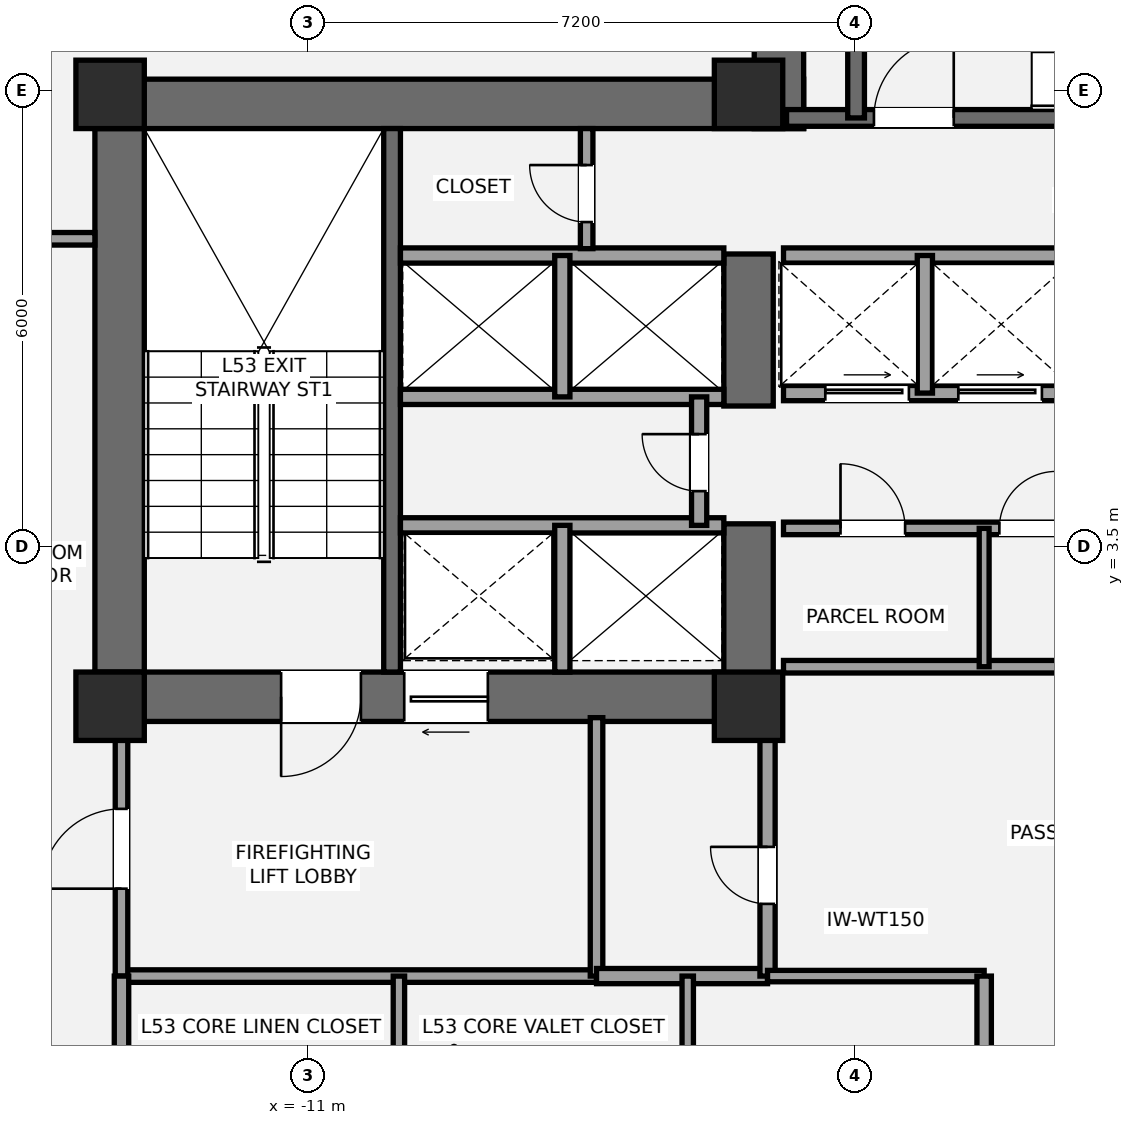
"""IFC4 building model, lengths in metres.
Left out: names, types, materials, properties, quantities, classifications, styles, units other than length and angle.
Written with IfcOpenShell. Run it as: python <this file> out.ifc"""

import sys

from ifc_helpers import new_model, si_unit, direction, frame, frame_2d, origin, origin_2d, place, context, subcontext, project, spatial, rectangle, extrude, element, fill, save


model = new_model("IFC4")
c1 = context("Model", 3, precision=1e-05, world=origin(), true_north=direction((0.0, 1.0)))
c2 = subcontext(c1, "Body", "Model", "MODEL_VIEW")
j1 = project(units=[si_unit("LENGTHUNIT", "METRE"), si_unit("PLANEANGLEUNIT", "RADIAN")], contexts=[c1])
p1 = place(None, origin())
s1 = spatial("IfcSite", under=j1, at=p1, CompositionType="ELEMENT")
p2 = place(p1, origin())
s2 = spatial("IfcBuilding", under=s1, at=p2, CompositionType="ELEMENT")
p3 = place(p2, frame((0.0, 0.0, 191.8)))
s3 = spatial("IfcBuildingStorey", under=s2, at=p3, CompositionType="ELEMENT", Elevation=191.8)
p4 = place(p3, frame((-13.475, 1.2, 0.0), z_axis=(0.0, 0.0, 1.0), x_axis=(0.0, 1.0, 0.0)))
e1 = element("IfcWall", 1, at=p4, inside=s3, PredefinedType="SHEAR", context=c2, shape_type="SweptSolid", body=[
    extrude(rectangle(XDim=8.45, YDim=0.65, at=frame_2d((4.225, 0.0))), origin(), (0.0, 0.0, 1.0), 3.2),
])
p5 = place(p3, frame((-13.8, 9.325, 0.0), z_axis=(0.0, 0.0, 1.0), x_axis=(1.0, 0.0, 0.0)))
e2 = element("IfcWall", 2, at=p5, inside=s3, PredefinedType="SHEAR", context=c2, shape_type="SweptSolid", body=[
    extrude(rectangle(XDim=9.325, YDim=0.65, at=frame_2d((4.663, 0.0))), origin(), (0.0, 0.0, 1.0), 3.2),
])
p6 = place(p3, frame((-4.875, 1.525, 0.0), z_axis=(0.0, 0.0, 1.0), x_axis=(-1.0, 0.0, 0.0)))
e3 = element("IfcWall", 3, at=p6, inside=s3, PredefinedType="SHEAR", context=c2, shape_type="SweptSolid", body=[
    extrude(rectangle(XDim=8.925, YDim=0.65, at=frame_2d((4.462, 0.0))), origin(), (0.0, 0.0, 1.0), 3.2),
])
p7 = place(p6, frame((5.425, 0.0, 0.0)))
e4 = element("IfcOpeningElement", 4, at=p7, cuts=e3, PredefinedType="OPENING", context=c2, shape_type="SweptSolid", body=[
    extrude(rectangle(XDim=1.05, YDim=2.15, at=frame_2d((0.525, 1.075))), frame((0.0, 0.335, 0.0), z_axis=(0.0, -1.0, 0.0), x_axis=(1.0, 0.0, 0.0)), (0.0, 0.0, 1.0), 0.67),
])
p8 = place(p6, frame((3.755, 0.0, 0.0)))
e5 = element("IfcOpeningElement", 5, at=p8, cuts=e3, PredefinedType="OPENING", context=c2, shape_type="SweptSolid", body=[
    extrude(rectangle(XDim=1.1, YDim=2.2, at=frame_2d((0.55, 1.1))), frame((0.0, 0.335, 0.0), z_axis=(0.0, -1.0, 0.0), x_axis=(1.0, 0.0, 0.0)), (0.0, 0.0, 1.0), 0.67),
])
p9 = place(p3, frame((-5.2, 1.2, 0.0), z_axis=(0.0, 0.0, 1.0), x_axis=(0.0, 1.0, 0.0)))
e6 = element("IfcWall", 6, at=p9, inside=s3, PredefinedType="SHEAR", context=c2, shape_type="SweptSolid", body=[
    extrude(rectangle(XDim=2.6, YDim=0.65, at=frame_2d((1.3, 0.0))), origin(), (0.0, 0.0, 1.0), 3.2),
])
p10 = place(p3, frame((-5.2, 5.35, 0.0), z_axis=(0.0, 0.0, 1.0), x_axis=(0.0, 1.0, 0.0)))
e7 = element("IfcWall", 7, at=p10, inside=s3, PredefinedType="SHEAR", context=c2, shape_type="SweptSolid", body=[
    extrude(rectangle(XDim=2.0, YDim=0.65, at=frame_2d((1.0, 0.0))), origin(), (0.0, 0.0, 1.0), 3.2),
])
p11 = place(p3, frame((-9.89, 1.85, 0.0), z_axis=(0.0, 0.0, 1.0), x_axis=(0.0, 1.0, 0.0)))
e8 = element("IfcWall", 8, at=p11, inside=s3, PredefinedType="SHEAR", context=c2, shape_type="SweptSolid", body=[
    extrude(rectangle(XDim=7.15, YDim=0.22, at=frame_2d((3.575, 0.0))), origin(), (0.0, 0.0, 1.0), 3.2),
])
p12 = place(p3, frame((-4.8, 9.0, 0.0), z_axis=(0.0, 0.0, 1.0), x_axis=(0.0, 1.0, 0.0)))
e9 = element("IfcWall", 9, at=p12, inside=s3, PredefinedType="SHEAR", context=c2, shape_type="SweptSolid", body=[
    extrude(rectangle(XDim=4.05, YDim=0.65, at=frame_2d((2.025, 0.0))), origin(), (0.0, 0.0, 1.0), 3.2),
])
p13 = place(p3, frame((-4.7, 9.14, 0.0), z_axis=(0.0, 0.0, 1.0), x_axis=(1.0, 0.0, 0.0)))
e10 = element("IfcWall", 10, at=p13, inside=s3, PredefinedType="SHEAR", context=c2, shape_type="SweptSolid", body=[
    extrude(rectangle(XDim=9.3, YDim=0.22, at=frame_2d((4.65, 0.0))), origin(), (0.0, 0.0, 1.0), 3.2),
])
p14 = place(p13, frame((1.15, 0.0, 0.0)))
e11 = element("IfcOpeningElement", 11, at=p14, cuts=e10, PredefinedType="OPENING", context=c2, shape_type="SweptSolid", body=[
    extrude(rectangle(XDim=1.05, YDim=2.15, at=frame_2d((0.525, 1.075))), frame((0.0, 0.12, 0.0), z_axis=(0.0, -1.0, 0.0), x_axis=(1.0, 0.0, 0.0)), (0.0, 0.0, 1.0), 0.24),
])
p15 = place(p3, frame((-3.785, 9.14, 0.0), z_axis=(0.0, 0.0, 1.0), x_axis=(0.0, 1.0, 0.0)))
e12 = element("IfcWall", 12, at=p15, inside=s3, PredefinedType="SHEAR", context=c2, shape_type="SweptSolid", body=[
    extrude(rectangle(XDim=3.26, YDim=0.22, at=frame_2d((1.63, 0.0))), origin(), (0.0, 0.0, 1.0), 3.2),
])
for number, where, z_axis, x_axis in (
    (13, (-13.6, 1.4, 0.0), (0.0, 0.0, 1.0), (1.0, 0.0, 0.0)),
    (14, (-13.6, 9.45, 0.0), (0.0, 0.0, 1.0), (1.0, 0.0, 0.0)),
    (15, (-5.2, 1.4, 0.0), (0.0, 0.0, 1.0), (1.0, 0.0, 0.0)),
    (16, (-5.2, 9.45, 0.0), (0.0, 0.0, 1.0), (1.0, 0.0, 0.0)),
):
    element("IfcColumn", number, at=place(p3, frame(where, z_axis=z_axis, x_axis=x_axis)), inside=s3, PredefinedType="COLUMN", context=c2, shape_type="SweptSolid", body=[
        extrude(rectangle(XDim=0.9, YDim=0.9, at=origin_2d()), origin(), (0.0, 0.0, 1.0), 3.2),
    ])
p16 = place(p3, frame((-13.45, -2.15, 0.0), z_axis=(0.0, 0.0, 1.0), x_axis=(1.0, 0.0, 0.0)))
e17 = element("IfcWall", 17, at=p16, inside=s3, PredefinedType="PARTITIONING", context=c2, shape_type="SweptSolid", body=[
    extrude(rectangle(XDim=6.25, YDim=0.165, at=frame_2d((3.125, 0.0))), origin(), (0.0, 0.0, 1.0), 2.473),
])
p17 = place(p3, frame((-13.45, -2.15, 0.0), z_axis=(0.0, 0.0, 1.0), x_axis=(0.0, 1.0, 0.0)))
e18 = element("IfcWall", 18, at=p17, inside=s3, PredefinedType="PARTITIONING", context=c2, shape_type="SweptSolid", body=[
    extrude(rectangle(XDim=3.4, YDim=0.165, at=frame_2d((1.7, 0.0))), origin(), (0.0, 0.0, 1.0), 2.473),
])
p18 = place(p17, frame((1.15, 0.0, 0.0)))
e19 = element("IfcOpeningElement", 19, at=p18, cuts=e18, PredefinedType="OPENING", context=c2, shape_type="SweptSolid", body=[
    extrude(rectangle(XDim=1.05, YDim=2.15, at=frame_2d((0.525, 1.075))), frame((0.0, 0.093, 0.0), z_axis=(0.0, -1.0, 0.0), x_axis=(1.0, 0.0, 0.0)), (0.0, 0.0, 1.0), 0.185),
])
p19 = place(p3, frame((-7.2, -2.15, 0.0), z_axis=(0.0, 0.0, 1.0), x_axis=(0.0, 1.0, 0.0)))
e20 = element("IfcWall", 20, at=p19, inside=s3, PredefinedType="PARTITIONING", context=c2, shape_type="SweptSolid", body=[
    extrude(rectangle(XDim=3.4, YDim=0.165, at=frame_2d((1.7, 0.0))), origin(), (0.0, 0.0, 1.0), 2.473),
])
p20 = place(p3, frame((-7.2, -2.15, 0.0), z_axis=(0.0, 0.0, 1.0), x_axis=(1.0, 0.0, 0.0)))
e21 = element("IfcWall", 21, at=p20, inside=s3, PredefinedType="SOLIDWALL", context=c2, shape_type="SweptSolid", body=[
    extrude(rectangle(XDim=2.25, YDim=0.2, at=frame_2d((1.125, 0.0))), origin(), (0.0, 0.0, 1.0), 3.02),
])
p21 = place(p3, frame((-4.95, -2.15, 0.0), z_axis=(0.0, 0.0, 1.0), x_axis=(0.0, 1.0, 0.0)))
e22 = element("IfcWall", 22, at=p21, inside=s3, PredefinedType="SOLIDWALL", context=c2, shape_type="SweptSolid", body=[
    extrude(rectangle(XDim=3.4, YDim=0.2, at=frame_2d((1.7, 0.0))), origin(), (0.0, 0.0, 1.0), 2.473),
])
p22 = place(p21, frame((0.95, 0.0, 0.0)))
e23 = element("IfcOpeningElement", 23, at=p22, cuts=e22, PredefinedType="OPENING", context=c2, shape_type="SweptSolid", body=[
    extrude(rectangle(XDim=0.75, YDim=2.1, at=frame_2d((0.375, 1.05))), frame((0.0, 0.11, 0.0), z_axis=(0.0, -1.0, 0.0), x_axis=(1.0, 0.0, 0.0)), (0.0, 0.0, 1.0), 0.22),
])
p23 = place(p3, frame((-9.78, 3.78, 0.0), z_axis=(0.0, 0.0, 1.0), x_axis=(1.0, 0.0, 0.0)))
e24 = element("IfcWall", 24, at=p23, inside=s3, PredefinedType="SOLIDWALL", context=c2, shape_type="SweptSolid", body=[
    extrude(rectangle(XDim=4.255, YDim=0.2, at=frame_2d((2.127, 0.0))), origin(), (0.0, 0.0, 1.0), 3.02),
])
p24 = place(p3, frame((-7.65, 1.85, 0.0), z_axis=(0.0, 0.0, 1.0), x_axis=(0.0, 1.0, 0.0)))
e25 = element("IfcWall", 25, at=p24, inside=s3, PredefinedType="SOLIDWALL", context=c2, shape_type="SweptSolid", body=[
    extrude(rectangle(XDim=1.93, YDim=0.2, at=frame_2d((0.965, 0.0))), origin(), (0.0, 0.0, 1.0), 3.02),
])
for number, where, z_axis, x_axis in (
    (26, (-9.78, 5.47, 0.0), (0.0, 0.0, 1.0), (1.0, 0.0, 0.0)),
    (27, (-9.78, 7.33, 0.0), (0.0, 0.0, 1.0), (1.0, 0.0, 0.0)),
):
    element("IfcWall", number, at=place(p3, frame(where, z_axis=z_axis, x_axis=x_axis)), inside=s3, PredefinedType="SOLIDWALL", context=c2, shape_type="SweptSolid", body=[
        extrude(rectangle(XDim=4.255, YDim=0.2, at=frame_2d((2.127, 0.0))), origin(), (0.0, 0.0, 1.0), 3.02),
    ])
p25 = place(p3, frame((-7.65, 5.47, 0.0), z_axis=(0.0, 0.0, 1.0), x_axis=(0.0, 1.0, 0.0)))
e28 = element("IfcWall", 28, at=p25, inside=s3, PredefinedType="SOLIDWALL", context=c2, shape_type="SweptSolid", body=[
    extrude(rectangle(XDim=1.86, YDim=0.2, at=frame_2d((0.93, 0.0))), origin(), (0.0, 0.0, 1.0), 3.02),
])
p26 = place(p3, frame((-5.85, 3.78, 0.0), z_axis=(0.0, 0.0, 1.0), x_axis=(0.0, 1.0, 0.0)))
e29 = element("IfcWall", 29, at=p26, inside=s3, PredefinedType="SOLIDWALL", context=c2, shape_type="SweptSolid", body=[
    extrude(rectangle(XDim=1.69, YDim=0.2, at=frame_2d((0.845, 0.0))), origin(), (0.0, 0.0, 1.0), 3.02),
])
p27 = place(p26, frame((0.45, 0.0, 0.0)))
e30 = element("IfcOpeningElement", 30, at=p27, cuts=e29, PredefinedType="OPENING", context=c2, shape_type="SweptSolid", body=[
    extrude(rectangle(XDim=0.75, YDim=2.1, at=frame_2d((0.375, 1.05))), frame((0.0, 0.11, 0.0), z_axis=(0.0, -1.0, 0.0), x_axis=(1.0, 0.0, 0.0)), (0.0, 0.0, 1.0), 0.22),
])
p28 = place(p3, frame((-4.74, 1.92, 0.0), z_axis=(0.0, 0.0, 1.0), x_axis=(1.0, 0.0, 0.0)))
e31 = element("IfcWall", 31, at=p28, inside=s3, PredefinedType="PARTITIONING", context=c2, shape_type="SweptSolid", body=[
    extrude(rectangle(XDim=3.89, YDim=0.165, at=frame_2d((1.945, 0.0))), origin(), (0.0, 0.0, 1.0), 2.16),
])
p29 = place(p3, frame((-4.74, 3.74, 0.0), z_axis=(0.0, 0.0, 1.0), x_axis=(1.0, 0.0, 0.0)))
e32 = element("IfcWall", 32, at=p29, inside=s3, PredefinedType="PARTITIONING", context=c2, shape_type="SweptSolid", body=[
    extrude(rectangle(XDim=3.89, YDim=0.165, at=frame_2d((1.945, 0.0))), origin(), (0.0, 0.0, 1.0), 3.02),
])
p30 = place(p29, frame((0.75, 0.0, 0.0)))
e33 = element("IfcOpeningElement", 33, at=p30, cuts=e32, PredefinedType="OPENING", context=c2, shape_type="SweptSolid", body=[
    extrude(rectangle(XDim=0.85, YDim=2.1, at=frame_2d((0.425, 1.05))), frame((0.0, 0.093, 0.0), z_axis=(0.0, -1.0, 0.0), x_axis=(1.0, 0.0, 0.0)), (0.0, 0.0, 1.0), 0.185),
])
p31 = place(p29, frame((2.84, 0.0, 0.0)))
e34 = element("IfcOpeningElement", 34, at=p31, cuts=e32, PredefinedType="OPENING", context=c2, shape_type="SweptSolid", body=[
    extrude(rectangle(XDim=0.75, YDim=2.1, at=frame_2d((0.375, 1.05))), frame((0.0, 0.093, 0.0), z_axis=(0.0, -1.0, 0.0), x_axis=(1.0, 0.0, 0.0)), (0.0, 0.0, 1.0), 0.185),
])
p32 = place(p3, frame((-2.1, 1.92, 0.0), z_axis=(0.0, 0.0, 1.0), x_axis=(0.0, 1.0, 0.0)))
e35 = element("IfcWall", 35, at=p32, inside=s3, PredefinedType="PARTITIONING", context=c2, shape_type="SweptSolid", body=[
    extrude(rectangle(XDim=1.82, YDim=0.13, at=frame_2d((0.91, 0.0))), origin(), (0.0, 0.0, 1.0), 3.02),
])
p33 = place(p3, frame((-4.74, 5.52, 0.0), z_axis=(0.0, 0.0, 1.0), x_axis=(1.0, 0.0, 0.0)))
e36 = element("IfcWall", 36, at=p33, inside=s3, PredefinedType="SOLIDWALL", context=c2, shape_type="SweptSolid", body=[
    extrude(rectangle(XDim=3.86, YDim=0.2, at=frame_2d((1.93, 0.0))), origin(), (0.0, 0.0, 1.0), 3.02),
])
p34 = place(p33, frame((0.55, 0.0, 0.0)))
e37 = element("IfcOpeningElement", 37, at=p34, cuts=e36, PredefinedType="OPENING", context=c2, shape_type="SweptSolid", body=[
    extrude(rectangle(XDim=1.1, YDim=2.2, at=frame_2d((0.55, 1.1))), frame((0.0, 0.11, 0.0), z_axis=(0.0, -1.0, 0.0), x_axis=(1.0, 0.0, 0.0)), (0.0, 0.0, 1.0), 0.22),
])
p35 = place(p33, frame((2.3, 0.0, 0.0)))
e38 = element("IfcOpeningElement", 38, at=p35, cuts=e36, PredefinedType="OPENING", context=c2, shape_type="SweptSolid", body=[
    extrude(rectangle(XDim=1.1, YDim=2.2, at=frame_2d((0.55, 1.1))), frame((0.0, 0.11, 0.0), z_axis=(0.0, -1.0, 0.0), x_axis=(1.0, 0.0, 0.0)), (0.0, 0.0, 1.0), 0.22),
])
p36 = place(p3, frame((-4.74, 7.33, 0.0), z_axis=(0.0, 0.0, 1.0), x_axis=(1.0, 0.0, 0.0)))
e39 = element("IfcWall", 39, at=p36, inside=s3, PredefinedType="SOLIDWALL", context=c2, shape_type="SweptSolid", body=[
    extrude(rectangle(XDim=3.86, YDim=0.2, at=frame_2d((1.93, 0.0))), origin(), (0.0, 0.0, 1.0), 3.02),
])
p37 = place(p3, frame((-2.88, 5.52, 0.0), z_axis=(0.0, 0.0, 1.0), x_axis=(0.0, 1.0, 0.0)))
e40 = element("IfcWall", 40, at=p37, inside=s3, PredefinedType="SOLIDWALL", context=c2, shape_type="SweptSolid", body=[
    extrude(rectangle(XDim=1.81, YDim=0.2, at=frame_2d((0.905, 0.0))), origin(), (0.0, 0.0, 1.0), 3.02),
])
p38 = place(p3, frame((-7.33, 7.42, 0.0), z_axis=(0.0, 0.0, 1.0), x_axis=(0.0, 1.0, 0.0)))
e41 = element("IfcWall", 41, at=p38, inside=s3, PredefinedType="PARTITIONING", context=c2, shape_type="SweptSolid", body=[
    extrude(rectangle(XDim=1.58, YDim=0.165, at=frame_2d((0.79, 0.0))), origin(), (0.0, 0.0, 1.0), 3.02),
])
p39 = place(p38, frame((0.35, 0.0, 0.0)))
e42 = element("IfcOpeningElement", 42, at=p39, cuts=e41, PredefinedType="OPENING", context=c2, shape_type="SweptSolid", body=[
    extrude(rectangle(XDim=0.75, YDim=2.1, at=frame_2d((0.375, 1.05))), frame((0.0, 0.093, 0.0), z_axis=(0.0, -1.0, 0.0), x_axis=(1.0, 0.0, 0.0)), (0.0, 0.0, 1.0), 0.185),
])
p40 = place(p3, frame((-4.95, -2.15, 0.0), z_axis=(0.0, 0.0, 1.0), x_axis=(1.0, 0.0, 0.0)))
e43 = element("IfcWall", 43, at=p40, inside=s3, PredefinedType="PLUMBINGWALL", context=c2, shape_type="SweptSolid", body=[
    extrude(rectangle(XDim=2.85, YDim=0.15, at=frame_2d((1.425, 0.0))), origin(), (0.0, 0.0, 1.0), 3.02),
])
p41 = place(p3, frame((-13.45, -4.05, 0.0), z_axis=(0.0, 0.0, 1.0), x_axis=(0.0, 1.0, 0.0)))
e44 = element("IfcWall", 44, at=p41, inside=s3, PredefinedType="PLUMBINGWALL", context=c2, shape_type="SweptSolid", body=[
    extrude(rectangle(XDim=1.9, YDim=0.19, at=frame_2d((0.95, 0.0))), origin(), (0.0, 0.0, 1.0), 2.473),
])
p42 = place(p3, frame((-2.1, -4.05, 0.0), z_axis=(0.0, 0.0, 1.0), x_axis=(0.0, 1.0, 0.0)))
e45 = element("IfcWall", 45, at=p42, inside=s3, PredefinedType="PLUMBINGWALL", context=c2, shape_type="SweptSolid", body=[
    extrude(rectangle(XDim=1.9, YDim=0.19, at=frame_2d((0.95, 0.0))), origin(), (0.0, 0.0, 1.0), 3.02),
])
for number, where, z_axis, x_axis in (
    (46, (-9.8, -4.05, 0.0), (0.0, 0.0, 1.0), (0.0, 1.0, 0.0)),
    (47, (-6.0, -4.05, 0.0), (0.0, 0.0, 1.0), (0.0, 1.0, 0.0)),
):
    element("IfcWall", number, at=place(p3, frame(where, z_axis=z_axis, x_axis=x_axis)), inside=s3, PredefinedType="PLUMBINGWALL", context=c2, shape_type="SweptSolid", body=[
        extrude(rectangle(XDim=1.9, YDim=0.15, at=frame_2d((0.95, 0.0))), origin(), (0.0, 0.0, 1.0), 2.473),
    ])
p43 = place(p3, frame((-16.1, 7.55, 0.0), z_axis=(0.0, 0.0, 1.0), x_axis=(1.0, 0.0, 0.0)))
e48 = element("IfcWall", 48, at=p43, inside=s3, PredefinedType="PARTITIONING", context=c2, shape_type="SweptSolid", body=[
    extrude(rectangle(XDim=2.3, YDim=0.165, at=frame_2d((1.15, 0.0))), origin(), (0.0, 0.0, 1.0), 3.02),
])
p44 = place(p43, frame((0.3, 0.0, 0.0)))
e49 = element("IfcOpeningElement", 49, at=p44, cuts=e48, PredefinedType="OPENING", context=c2, shape_type="SweptSolid", body=[
    extrude(rectangle(XDim=1.0, YDim=2.15, at=frame_2d((0.5, 1.075))), frame((0.0, 0.093, 0.0), z_axis=(0.0, -1.0, 0.0), x_axis=(1.0, 0.0, 0.0)), (0.0, 0.0, 1.0), 0.185),
])
p45 = place(p7, origin())
e50 = element("IfcDoor", 50, at=p45, inside=s3, OperationType="SINGLE_SWING_RIGHT", PredefinedType="DOOR", context=c2, shape_type="SweptSolid", body=[
    extrude(rectangle(XDim=1.05, YDim=2.15, at=frame_2d((0.525, 1.075))), frame((0.0, 0.025, 0.0), z_axis=(0.0, -1.0, 0.0), x_axis=(1.0, 0.0, 0.0)), (0.0, 0.0, 1.0), 0.05),
])
fill(e4, e50)
p46 = place(p14, origin())
e51 = element("IfcDoor", 51, at=p46, inside=s3, OperationType="SINGLE_SWING_RIGHT", PredefinedType="DOOR", context=c2, shape_type="SweptSolid", body=[
    extrude(rectangle(XDim=1.05, YDim=2.15, at=frame_2d((0.525, 1.075))), frame((0.0, 0.025, 0.0), z_axis=(0.0, -1.0, 0.0), x_axis=(1.0, 0.0, 0.0)), (0.0, 0.0, 1.0), 0.05),
])
fill(e11, e51)
p47 = place(p18, origin())
e52 = element("IfcDoor", 52, at=p47, inside=s3, OperationType="SINGLE_SWING_LEFT", PredefinedType="DOOR", context=c2, shape_type="SweptSolid", body=[
    extrude(rectangle(XDim=1.05, YDim=2.15, at=frame_2d((0.525, 1.075))), frame((0.0, 0.025, 0.0), z_axis=(0.0, -1.0, 0.0), x_axis=(1.0, 0.0, 0.0)), (0.0, 0.0, 1.0), 0.05),
])
fill(e19, e52)
p48 = place(p22, origin())
e53 = element("IfcDoor", 53, at=p48, inside=s3, OperationType="SINGLE_SWING_RIGHT", PredefinedType="DOOR", context=c2, shape_type="SweptSolid", body=[
    extrude(rectangle(XDim=0.75, YDim=2.1, at=frame_2d((0.375, 1.05))), frame((0.0, 0.025, 0.0), z_axis=(0.0, -1.0, 0.0), x_axis=(1.0, 0.0, 0.0)), (0.0, 0.0, 1.0), 0.05),
])
fill(e23, e53)
p49 = place(p8, origin())
e54 = element("IfcDoor", 54, at=p49, inside=s3, OperationType="SLIDING_TO_LEFT", PredefinedType="DOOR", context=c2, shape_type="SweptSolid", body=[
    extrude(rectangle(XDim=1.1, YDim=2.2, at=frame_2d((0.55, 1.1))), frame((0.0, 0.025, 0.0), z_axis=(0.0, -1.0, 0.0), x_axis=(1.0, 0.0, 0.0)), (0.0, 0.0, 1.0), 0.05),
])
fill(e5, e54)
p50 = place(p27, origin())
e55 = element("IfcDoor", 55, at=p50, inside=s3, OperationType="SINGLE_SWING_RIGHT", PredefinedType="DOOR", context=c2, shape_type="SweptSolid", body=[
    extrude(rectangle(XDim=0.75, YDim=2.1, at=frame_2d((0.375, 1.05))), frame((0.0, 0.025, 0.0), z_axis=(0.0, -1.0, 0.0), x_axis=(1.0, 0.0, 0.0)), (0.0, 0.0, 1.0), 0.05),
])
fill(e30, e55)
p51 = place(p30, origin())
e56 = element("IfcDoor", 56, at=p51, inside=s3, OperationType="SINGLE_SWING_LEFT", PredefinedType="DOOR", context=c2, shape_type="SweptSolid", body=[
    extrude(rectangle(XDim=0.85, YDim=2.1, at=frame_2d((0.425, 1.05))), frame((0.0, 0.025, 0.0), z_axis=(0.0, -1.0, 0.0), x_axis=(1.0, 0.0, 0.0)), (0.0, 0.0, 1.0), 0.05),
])
fill(e33, e56)
p52 = place(p31, origin())
e57 = element("IfcDoor", 57, at=p52, inside=s3, OperationType="SINGLE_SWING_RIGHT", PredefinedType="DOOR", context=c2, shape_type="SweptSolid", body=[
    extrude(rectangle(XDim=0.75, YDim=2.1, at=frame_2d((0.375, 1.05))), frame((0.0, 0.025, 0.0), z_axis=(0.0, -1.0, 0.0), x_axis=(1.0, 0.0, 0.0)), (0.0, 0.0, 1.0), 0.05),
])
fill(e34, e57)
p53 = place(p34, origin())
e58 = element("IfcDoor", 58, at=p53, inside=s3, OperationType="SLIDING_TO_LEFT", PredefinedType="DOOR", context=c2, shape_type="SweptSolid", body=[
    extrude(rectangle(XDim=1.1, YDim=2.2, at=frame_2d((0.55, 1.1))), frame((0.0, 0.025, 0.0), z_axis=(0.0, -1.0, 0.0), x_axis=(1.0, 0.0, 0.0)), (0.0, 0.0, 1.0), 0.05),
])
fill(e37, e58)
p54 = place(p35, origin())
e59 = element("IfcDoor", 59, at=p54, inside=s3, OperationType="SLIDING_TO_LEFT", PredefinedType="DOOR", context=c2, shape_type="SweptSolid", body=[
    extrude(rectangle(XDim=1.1, YDim=2.2, at=frame_2d((0.55, 1.1))), frame((0.0, 0.025, 0.0), z_axis=(0.0, -1.0, 0.0), x_axis=(1.0, 0.0, 0.0)), (0.0, 0.0, 1.0), 0.05),
])
fill(e38, e59)
p55 = place(p39, origin())
e60 = element("IfcDoor", 60, at=p55, inside=s3, OperationType="SINGLE_SWING_RIGHT", PredefinedType="DOOR", context=c2, shape_type="SweptSolid", body=[
    extrude(rectangle(XDim=0.75, YDim=2.1, at=frame_2d((0.375, 1.05))), frame((0.0, 0.025, 0.0), z_axis=(0.0, -1.0, 0.0), x_axis=(1.0, 0.0, 0.0)), (0.0, 0.0, 1.0), 0.05),
])
fill(e42, e60)
save(model, sys.argv[1])
